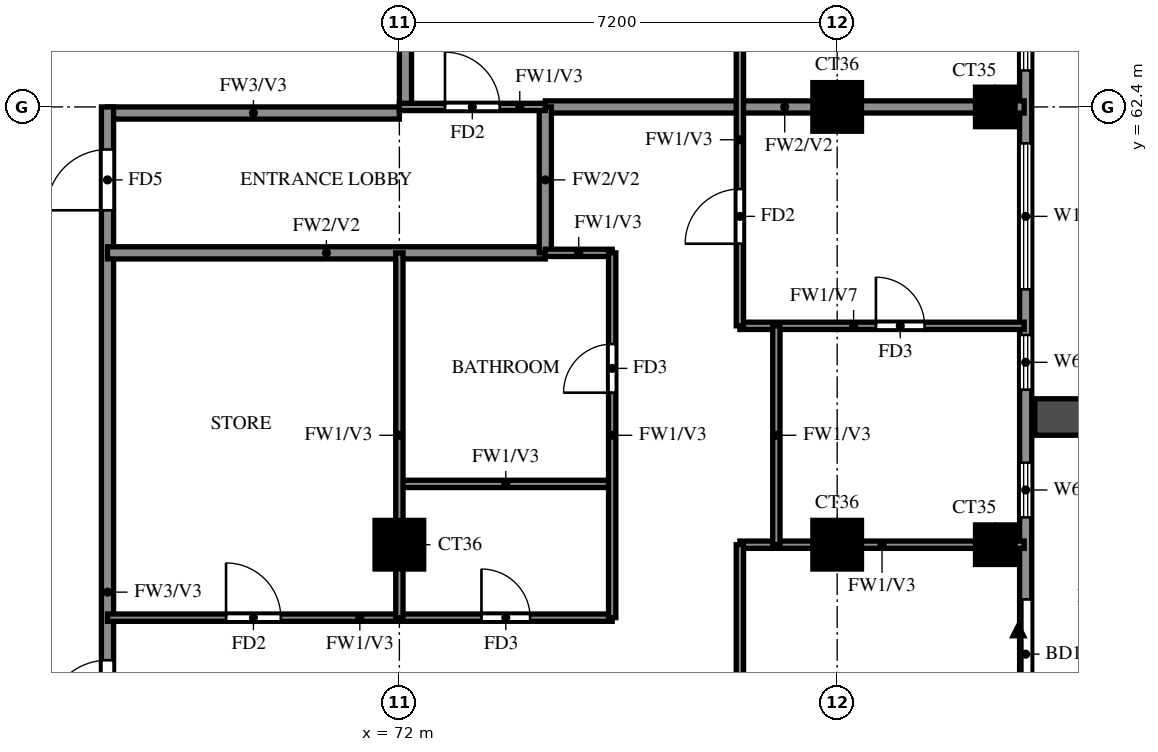
"""IFC4 building model, lengths in metres.
Left out: names, types, materials, properties, quantities, classifications, styles, units other than length and angle.
Written with IfcOpenShell. Run it as: python <this file> out.ifc"""

import sys

from ifc_helpers import new_model, si_unit, direction, frame, frame_2d, origin, origin_2d, place, context, subcontext, project, spatial, rectangle, extrude, source, transform, mapped, element, fill, save


model = new_model("IFC4")
c1 = context("Model", 3, precision=1e-05, world=origin(), true_north=direction((0.0, 1.0)))
c2 = subcontext(c1, "Body", "Model", "MODEL_VIEW")
j1 = project(units=[si_unit("LENGTHUNIT", "METRE"), si_unit("PLANEANGLEUNIT", "RADIAN")], contexts=[c1])
p1 = place(None, origin())
s1 = spatial("IfcSite", under=j1, at=p1, CompositionType="ELEMENT")
p2 = place(p1, origin())
s2 = spatial("IfcBuilding", under=s1, at=p2, CompositionType="ELEMENT")
p3 = place(p2, frame((0.0, 0.0, 232.5)))
s3 = spatial("IfcBuildingStorey", under=s2, at=p3, CompositionType="ELEMENT", Elevation=232.5)
m1 = source(origin(), c2, "Body", "SweptSolid", [
    extrude(rectangle(XDim=0.8, YDim=0.8, at=origin_2d()), origin(), (0.0, 0.0, 1.0), 3.22),
])
for number, where, z_axis, x_axis in (
    (1, (72.0, 55.2, 0.0), (0.0, 0.0, 1.0), (1.0, 0.0, 0.0)),
    (2, (79.2, 55.2, 0.0), (0.0, 0.0, 1.0), (1.0, 0.0, 0.0)),
):
    element("IfcColumn", number, at=place(p3, frame(where, z_axis=z_axis, x_axis=x_axis)), inside=s3, PredefinedType="COLUMN", context=c2, shape_type="MappedRepresentation", body=[
        mapped(m1, transform((0.0, 0.0, 0.0))),
    ])
m2 = source(origin(), c2, "Body", "SweptSolid", [
    extrude(rectangle(XDim=0.65, YDim=0.65, at=origin_2d()), origin(), (0.0, 0.0, 1.0), 3.22),
])
p4 = place(p3, frame((81.8, 55.2, 0.0), z_axis=(0.0, 0.0, 1.0), x_axis=(1.0, 0.0, 0.0)))
e3 = element("IfcColumn", 3, at=p4, inside=s3, PredefinedType="COLUMN", context=c2, shape_type="MappedRepresentation", body=[
    mapped(m2, transform((0.0, 0.0, 0.0))),
])
p5 = place(p3, frame((79.2, 62.4, 0.0), z_axis=(0.0, 0.0, 1.0), x_axis=(1.0, 0.0, 0.0)))
e4 = element("IfcColumn", 4, at=p5, inside=s3, PredefinedType="COLUMN", context=c2, shape_type="MappedRepresentation", body=[
    mapped(m1, transform((0.0, 0.0, 0.0))),
])
p6 = place(p3, frame((81.8, 62.4, 0.0), z_axis=(0.0, 0.0, 1.0), x_axis=(1.0, 0.0, 0.0)))
e5 = element("IfcColumn", 5, at=p6, inside=s3, PredefinedType="COLUMN", context=c2, shape_type="MappedRepresentation", body=[
    mapped(m2, transform((0.0, 0.0, 0.0))),
])
p7 = place(p3, frame((82.3, 48.2, 0.0), z_axis=(0.0, 0.0, 1.0), x_axis=(0.0, 1.0, 0.0)))
e6 = element("IfcWall", 6, at=p7, inside=s3, PredefinedType="SOLIDWALL", context=c2, shape_type="SweptSolid", body=[
    extrude(rectangle(XDim=28.6, YDim=0.2, at=frame_2d((14.3, 0.0))), origin(), (0.0, 0.0, 1.0), 3.22),
])
p8 = place(p7, frame((4.3, 0.0, 0.0)))
e7 = element("IfcOpeningElement", 7, at=p8, cuts=e6, PredefinedType="OPENING", context=c2, shape_type="SweptSolid", body=[
    extrude(rectangle(XDim=1.8, YDim=2.4, at=frame_2d((0.9, 1.2))), frame((0.0, 0.11, 0.0), z_axis=(0.0, -1.0, 0.0), x_axis=(1.0, 0.0, 0.0)), (0.0, 0.0, 1.0), 0.22),
])
p9 = place(p7, frame((0.6, 0.0, 0.6)))
e8 = element("IfcOpeningElement", 8, at=p9, cuts=e6, PredefinedType="OPENING", context=c2, shape_type="SweptSolid", body=[
    extrude(rectangle(XDim=1.2, YDim=2.4, at=frame_2d((0.6, 1.2))), frame((0.0, 0.11, 0.0), z_axis=(0.0, -1.0, 0.0), x_axis=(1.0, 0.0, 0.0)), (0.0, 0.0, 1.0), 0.22),
])
p10 = place(p7, frame((2.95, 0.0, 0.6)))
e9 = element("IfcOpeningElement", 9, at=p10, cuts=e6, PredefinedType="OPENING", context=c2, shape_type="SweptSolid", body=[
    extrude(rectangle(XDim=0.9, YDim=2.4, at=frame_2d((0.45, 1.2))), frame((0.0, 0.11, 0.0), z_axis=(0.0, -1.0, 0.0), x_axis=(1.0, 0.0, 0.0)), (0.0, 0.0, 1.0), 0.22),
])
p11 = place(p7, frame((11.2, 0.0, 0.6)))
e10 = element("IfcOpeningElement", 10, at=p11, cuts=e6, PredefinedType="OPENING", context=c2, shape_type="SweptSolid", body=[
    extrude(rectangle(XDim=2.4, YDim=2.4, at=frame_2d((1.2, 1.2))), frame((0.0, 0.11, 0.0), z_axis=(0.0, -1.0, 0.0), x_axis=(1.0, 0.0, 0.0)), (0.0, 0.0, 1.0), 0.22),
])
p12 = place(p7, frame((7.45, 0.0, 1.5)))
e11 = element("IfcOpeningElement", 11, at=p12, cuts=e6, PredefinedType="OPENING", context=c2, shape_type="SweptSolid", body=[
    extrude(rectangle(XDim=0.9, YDim=0.9, at=frame_2d((0.45, 0.45))), frame((0.0, 0.11, 0.0), z_axis=(0.0, -1.0, 0.0), x_axis=(1.0, 0.0, 0.0)), (0.0, 0.0, 1.0), 0.22),
])
p13 = place(p7, frame((9.55, 0.0, 1.5)))
e12 = element("IfcOpeningElement", 12, at=p13, cuts=e6, PredefinedType="OPENING", context=c2, shape_type="SweptSolid", body=[
    extrude(rectangle(XDim=0.9, YDim=0.9, at=frame_2d((0.45, 0.45))), frame((0.0, 0.11, 0.0), z_axis=(0.0, -1.0, 0.0), x_axis=(1.0, 0.0, 0.0)), (0.0, 0.0, 1.0), 0.22),
])
p14 = place(p7, frame((14.8, 0.0, 0.6)))
e13 = element("IfcOpeningElement", 13, at=p14, cuts=e6, PredefinedType="OPENING", context=c2, shape_type="SweptSolid", body=[
    extrude(rectangle(XDim=2.4, YDim=2.4, at=frame_2d((1.2, 1.2))), frame((0.0, 0.11, 0.0), z_axis=(0.0, -1.0, 0.0), x_axis=(1.0, 0.0, 0.0)), (0.0, 0.0, 1.0), 0.22),
])
p15 = place(p7, frame((19.15, 0.0, 1.5)))
e14 = element("IfcOpeningElement", 14, at=p15, cuts=e6, PredefinedType="OPENING", context=c2, shape_type="SweptSolid", body=[
    extrude(rectangle(XDim=0.9, YDim=0.9, at=frame_2d((0.45, 0.45))), frame((0.0, 0.11, 0.0), z_axis=(0.0, -1.0, 0.0), x_axis=(1.0, 0.0, 0.0)), (0.0, 0.0, 1.0), 0.22),
])
p16 = place(p7, frame((22.0, 0.0, 0.6)))
e15 = element("IfcOpeningElement", 15, at=p16, cuts=e6, PredefinedType="OPENING", context=c2, shape_type="SweptSolid", body=[
    extrude(rectangle(XDim=2.4, YDim=2.4, at=frame_2d((1.2, 1.2))), frame((0.0, 0.11, 0.0), z_axis=(0.0, -1.0, 0.0), x_axis=(1.0, 0.0, 0.0)), (0.0, 0.0, 1.0), 0.22),
])
p17 = place(p7, frame((25.5, 0.0, 0.6)))
e16 = element("IfcOpeningElement", 16, at=p17, cuts=e6, PredefinedType="OPENING", context=c2, shape_type="SweptSolid", body=[
    extrude(rectangle(XDim=2.4, YDim=2.4, at=frame_2d((1.2, 1.2))), frame((0.0, 0.11, 0.0), z_axis=(0.0, -1.0, 0.0), x_axis=(1.0, 0.0, 0.0)), (0.0, 0.0, 1.0), 0.22),
])
p18 = place(p3, frame((82.45, 57.3, 0.0), z_axis=(0.0, 0.0, 1.0), x_axis=(1.0, 0.0, 0.0)))
e17 = element("IfcWall", 17, at=p18, inside=s3, PredefinedType="SOLIDWALL", context=c2, shape_type="SweptSolid", body=[
    extrude(rectangle(XDim=2.65, YDim=0.6, at=frame_2d((1.325, 0.0))), origin(), (0.0, 0.0, 1.0), 2.85),
])
p19 = place(p3, frame((67.2, 62.3, 0.0), z_axis=(0.0, 0.0, 1.0), x_axis=(1.0, 0.0, 0.0)))
e18 = element("IfcWall", 18, at=p19, inside=s3, PredefinedType="SOLIDWALL", context=c2, shape_type="SweptSolid", body=[
    extrude(rectangle(XDim=4.8, YDim=0.2, at=frame_2d((2.4, 0.0))), origin(), (0.0, 0.0, 1.0), 3.22),
])
p20 = place(p3, frame((67.2, 45.6, 0.0), z_axis=(0.0, 0.0, 1.0), x_axis=(0.0, 1.0, 0.0)))
e19 = element("IfcWall", 19, at=p20, inside=s3, PredefinedType="SOLIDWALL", context=c2, shape_type="SweptSolid", body=[
    extrude(rectangle(XDim=16.8, YDim=0.2, at=frame_2d((8.4, 0.0))), origin(), (0.0, 0.0, 1.0), 3.22),
])
p21 = place(p20, frame((6.7, 0.0, 0.0)))
e20 = element("IfcOpeningElement", 20, at=p21, cuts=e19, PredefinedType="OPENING", context=c2, shape_type="SweptSolid", body=[
    extrude(rectangle(XDim=1.0, YDim=2.1, at=frame_2d((0.5, 1.05))), frame((0.0, 0.11, 0.0), z_axis=(0.0, -1.0, 0.0), x_axis=(1.0, 0.0, 0.0)), (0.0, 0.0, 1.0), 0.22),
])
p22 = place(p20, frame((15.1, 0.0, 0.0)))
e21 = element("IfcOpeningElement", 21, at=p22, cuts=e19, PredefinedType="OPENING", context=c2, shape_type="SweptSolid", body=[
    extrude(rectangle(XDim=1.0, YDim=2.1, at=frame_2d((0.5, 1.05))), frame((0.0, 0.11, 0.0), z_axis=(0.0, -1.0, 0.0), x_axis=(1.0, 0.0, 0.0)), (0.0, 0.0, 1.0), 0.22),
])
p23 = place(p20, frame((0.7, 0.0, 0.0)))
e22 = element("IfcOpeningElement", 22, at=p23, cuts=e19, PredefinedType="OPENING", context=c2, shape_type="SweptSolid", body=[
    extrude(rectangle(XDim=1.0, YDim=2.1, at=frame_2d((0.5, 1.05))), frame((0.0, 0.11, 0.0), z_axis=(0.0, -1.0, 0.0), x_axis=(1.0, 0.0, 0.0)), (0.0, 0.0, 1.0), 0.22),
])
p24 = place(p3, frame((72.1, 62.4, 0.0), z_axis=(0.0, 0.0, 1.0), x_axis=(0.0, 1.0, 0.0)))
e23 = element("IfcWall", 23, at=p24, inside=s3, PredefinedType="SOLIDWALL", context=c2, shape_type="SweptSolid", body=[
    extrude(rectangle(XDim=15.6, YDim=0.2, at=frame_2d((7.8, 0.0))), origin(), (0.0, 0.0, 1.0), 3.22),
])
p25 = place(p3, frame((67.2, 60.0, 0.0), z_axis=(0.0, 0.0, 1.0), x_axis=(1.0, 0.0, 0.0)))
e24 = element("IfcWall", 24, at=p25, inside=s3, PredefinedType="SOLIDWALL", context=c2, shape_type="SweptSolid", body=[
    extrude(rectangle(XDim=7.2, YDim=0.2, at=frame_2d((3.6, 0.0))), origin(), (0.0, 0.0, 1.0), 3.22),
])
p26 = place(p3, frame((74.4, 62.4, 0.0), z_axis=(0.0, 0.0, 1.0), x_axis=(1.0, 0.0, 0.0)))
e25 = element("IfcWall", 25, at=p26, inside=s3, PredefinedType="SOLIDWALL", context=c2, shape_type="SweptSolid", body=[
    extrude(rectangle(XDim=7.875, YDim=0.2, at=frame_2d((3.938, 0.0))), origin(), (0.0, 0.0, 1.0), 3.22),
])
p27 = place(p3, frame((74.4, 60.0, 0.0), z_axis=(0.0, 0.0, 1.0), x_axis=(0.0, 1.0, 0.0)))
e26 = element("IfcWall", 26, at=p27, inside=s3, PredefinedType="SOLIDWALL", context=c2, shape_type="SweptSolid", body=[
    extrude(rectangle(XDim=2.4, YDim=0.2, at=frame_2d((1.2, 0.0))), origin(), (0.0, 0.0, 1.0), 3.22),
])
p28 = place(p3, frame((67.2, 54.0, 0.0), z_axis=(0.0, 0.0, 1.0), x_axis=(1.0, 0.0, 0.0)))
e27 = element("IfcWall", 27, at=p28, inside=s3, PredefinedType="PARTITIONING", context=c2, shape_type="SweptSolid", body=[
    extrude(rectangle(XDim=8.3, YDim=0.12, at=frame_2d((4.15, 0.0))), origin(), (0.0, 0.0, 1.0), 3.22),
])
p29 = place(p28, frame((6.15, 0.0, 0.0)))
e28 = element("IfcOpeningElement", 28, at=p29, cuts=e27, PredefinedType="OPENING", context=c2, shape_type="SweptSolid", body=[
    extrude(rectangle(XDim=0.8, YDim=2.1, at=frame_2d((0.4, 1.05))), frame((0.0, 0.07, 0.0), z_axis=(0.0, -1.0, 0.0), x_axis=(1.0, 0.0, 0.0)), (0.0, 0.0, 1.0), 0.14),
])
p30 = place(p28, frame((1.95, 0.0, 0.0)))
e29 = element("IfcOpeningElement", 29, at=p30, cuts=e27, PredefinedType="OPENING", context=c2, shape_type="SweptSolid", body=[
    extrude(rectangle(XDim=0.9, YDim=2.1, at=frame_2d((0.45, 1.05))), frame((0.0, 0.07, 0.0), z_axis=(0.0, -1.0, 0.0), x_axis=(1.0, 0.0, 0.0)), (0.0, 0.0, 1.0), 0.14),
])
p31 = place(p3, frame((77.6, 55.2, 0.0), z_axis=(0.0, 0.0, 1.0), x_axis=(1.0, 0.0, 0.0)))
e30 = element("IfcWall", 30, at=p31, inside=s3, PredefinedType="PARTITIONING", context=c2, shape_type="SweptSolid", body=[
    extrude(rectangle(XDim=4.675, YDim=0.12, at=frame_2d((2.337, 0.0))), origin(), (0.0, 0.0, 1.0), 3.22),
])
p32 = place(p3, frame((72.0, 56.2, 0.0), z_axis=(0.0, 0.0, 1.0), x_axis=(1.0, 0.0, 0.0)))
e31 = element("IfcWall", 31, at=p32, inside=s3, PredefinedType="PARTITIONING", context=c2, shape_type="SweptSolid", body=[
    extrude(rectangle(XDim=3.5, YDim=0.12, at=frame_2d((1.75, 0.0))), origin(), (0.0, 0.0, 1.0), 3.22),
])
p33 = place(p3, frame((77.6, 58.8, 0.0), z_axis=(0.0, 0.0, 1.0), x_axis=(1.0, 0.0, 0.0)))
e32 = element("IfcWall", 32, at=p33, inside=s3, PredefinedType="PARTITIONING", context=c2, shape_type="SweptSolid", body=[
    extrude(rectangle(XDim=4.675, YDim=0.12, at=frame_2d((2.337, 0.0))), origin(), (0.0, 0.0, 1.0), 2.32),
])
p34 = place(p33, frame((2.238, 0.0, 0.0)))
e33 = element("IfcOpeningElement", 33, at=p34, cuts=e32, PredefinedType="OPENING", context=c2, shape_type="SweptSolid", body=[
    extrude(rectangle(XDim=0.8, YDim=2.1, at=frame_2d((0.4, 1.05))), frame((0.0, 0.07, 0.0), z_axis=(0.0, -1.0, 0.0), x_axis=(1.0, 0.0, 0.0)), (0.0, 0.0, 1.0), 0.14),
])
p35 = place(p3, frame((74.4, 60.0, 0.0), z_axis=(0.0, 0.0, 1.0), x_axis=(1.0, 0.0, 0.0)))
e34 = element("IfcWall", 34, at=p35, inside=s3, PredefinedType="PARTITIONING", context=c2, shape_type="SweptSolid", body=[
    extrude(rectangle(XDim=1.1, YDim=0.12, at=frame_2d((0.55, 0.0))), origin(), (0.0, 0.0, 1.0), 3.22),
])
p36 = place(p3, frame((72.0, 62.4, 0.0), z_axis=(0.0, 0.0, 1.0), x_axis=(1.0, 0.0, 0.0)))
e35 = element("IfcWall", 35, at=p36, inside=s3, PredefinedType="PARTITIONING", context=c2, shape_type="SweptSolid", body=[
    extrude(rectangle(XDim=2.4, YDim=0.12, at=frame_2d((1.2, 0.0))), origin(), (0.0, 0.0, 1.0), 3.22),
])
p37 = place(p36, frame((0.75, 0.0, 0.0)))
e36 = element("IfcOpeningElement", 36, at=p37, cuts=e35, PredefinedType="OPENING", context=c2, shape_type="SweptSolid", body=[
    extrude(rectangle(XDim=0.9, YDim=2.1, at=frame_2d((0.45, 1.05))), frame((0.0, 0.07, 0.0), z_axis=(0.0, -1.0, 0.0), x_axis=(1.0, 0.0, 0.0)), (0.0, 0.0, 1.0), 0.14),
])
p38 = place(p3, frame((72.0, 54.0, 0.0), z_axis=(0.0, 0.0, 1.0), x_axis=(0.0, 1.0, 0.0)))
e37 = element("IfcWall", 37, at=p38, inside=s3, PredefinedType="PARTITIONING", context=c2, shape_type="SweptSolid", body=[
    extrude(rectangle(XDim=6.0, YDim=0.12, at=frame_2d((3.0, 0.0))), origin(), (0.0, 0.0, 1.0), 3.22),
])
p39 = place(p3, frame((75.5, 54.0, 0.0), z_axis=(0.0, 0.0, 1.0), x_axis=(0.0, 1.0, 0.0)))
e38 = element("IfcWall", 38, at=p39, inside=s3, PredefinedType="PARTITIONING", context=c2, shape_type="SweptSolid", body=[
    extrude(rectangle(XDim=6.0, YDim=0.12, at=frame_2d((3.0, 0.0))), origin(), (0.0, 0.0, 1.0), 3.22),
])
p40 = place(p39, frame((3.7, 0.0, 0.0)))
e39 = element("IfcOpeningElement", 39, at=p40, cuts=e38, PredefinedType="OPENING", context=c2, shape_type="SweptSolid", body=[
    extrude(rectangle(XDim=0.8, YDim=2.1, at=frame_2d((0.4, 1.05))), frame((0.0, 0.07, 0.0), z_axis=(0.0, -1.0, 0.0), x_axis=(1.0, 0.0, 0.0)), (0.0, 0.0, 1.0), 0.14),
])
p41 = place(p3, frame((77.6, 48.125, 0.0), z_axis=(0.0, 0.0, 1.0), x_axis=(0.0, 1.0, 0.0)))
e40 = element("IfcWall", 40, at=p41, inside=s3, PredefinedType="PARTITIONING", context=c2, shape_type="SweptSolid", body=[
    extrude(rectangle(XDim=7.075, YDim=0.12, at=frame_2d((3.538, 0.0))), origin(), (0.0, 0.0, 1.0), 3.22),
])
p42 = place(p41, frame((2.788, 0.0, 0.0)))
e41 = element("IfcOpeningElement", 41, at=p42, cuts=e40, PredefinedType="OPENING", context=c2, shape_type="SweptSolid", body=[
    extrude(rectangle(XDim=1.5, YDim=2.1, at=frame_2d((0.75, 1.05))), frame((0.0, 0.07, 0.0), z_axis=(0.0, -1.0, 0.0), x_axis=(1.0, 0.0, 0.0)), (0.0, 0.0, 1.0), 0.14),
])
p43 = place(p3, frame((77.6, 58.8, 0.0), z_axis=(0.0, 0.0, 1.0), x_axis=(0.0, 1.0, 0.0)))
e42 = element("IfcWall", 42, at=p43, inside=s3, PredefinedType="PARTITIONING", context=c2, shape_type="SweptSolid", body=[
    extrude(rectangle(XDim=7.2, YDim=0.12, at=frame_2d((3.6, 0.0))), origin(), (0.0, 0.0, 1.0), 3.22),
])
p44 = place(p43, frame((1.35, 0.0, 0.0)))
e43 = element("IfcOpeningElement", 43, at=p44, cuts=e42, PredefinedType="OPENING", context=c2, shape_type="SweptSolid", body=[
    extrude(rectangle(XDim=0.9, YDim=2.1, at=frame_2d((0.45, 1.05))), frame((0.0, 0.07, 0.0), z_axis=(0.0, -1.0, 0.0), x_axis=(1.0, 0.0, 0.0)), (0.0, 0.0, 1.0), 0.14),
])
p45 = place(p43, frame((4.95, 0.0, 0.0)))
e44 = element("IfcOpeningElement", 44, at=p45, cuts=e42, PredefinedType="OPENING", context=c2, shape_type="SweptSolid", body=[
    extrude(rectangle(XDim=0.9, YDim=2.1, at=frame_2d((0.45, 1.05))), frame((0.0, 0.07, 0.0), z_axis=(0.0, -1.0, 0.0), x_axis=(1.0, 0.0, 0.0)), (0.0, 0.0, 1.0), 0.14),
])
p46 = place(p3, frame((78.2, 55.2, 0.0), z_axis=(0.0, 0.0, 1.0), x_axis=(0.0, 1.0, 0.0)))
e45 = element("IfcWall", 45, at=p46, inside=s3, PredefinedType="PARTITIONING", context=c2, shape_type="SweptSolid", body=[
    extrude(rectangle(XDim=3.6, YDim=0.12, at=frame_2d((1.8, 0.0))), origin(), (0.0, 0.0, 1.0), 3.22),
])
p47 = place(p8, origin())
e46 = element("IfcDoor", 46, at=p47, inside=s3, OperationType="DOUBLE_DOOR_SLIDING", PredefinedType="DOOR", context=c2, shape_type="SweptSolid", body=[
    extrude(rectangle(XDim=1.8, YDim=2.4, at=frame_2d((0.9, 1.2))), frame((0.0, 0.025, 0.0), z_axis=(0.0, -1.0, 0.0), x_axis=(1.0, 0.0, 0.0)), (0.0, 0.0, 1.0), 0.05),
])
fill(e7, e46)
p48 = place(p11, origin())
e47 = element("IfcWindow", 47, at=p48, inside=s3, PartitioningType="DOUBLE_PANEL_VERTICAL", PredefinedType="WINDOW", context=c2, shape_type="SweptSolid", body=[
    extrude(rectangle(XDim=2.4, YDim=2.4, at=frame_2d((1.2, 1.2))), frame((0.0, 0.03, 0.0), z_axis=(0.0, -1.0, 0.0), x_axis=(1.0, 0.0, 0.0)), (0.0, 0.0, 1.0), 0.06),
])
fill(e10, e47)
p49 = place(p12, origin())
e48 = element("IfcWindow", 48, at=p49, inside=s3, PartitioningType="SINGLE_PANEL", PredefinedType="WINDOW", context=c2, shape_type="SweptSolid", body=[
    extrude(rectangle(XDim=0.9, YDim=0.9, at=frame_2d((0.45, 0.45))), frame((0.0, 0.03, 0.0), z_axis=(0.0, -1.0, 0.0), x_axis=(1.0, 0.0, 0.0)), (0.0, 0.0, 1.0), 0.06),
])
fill(e11, e48)
p50 = place(p13, origin())
e49 = element("IfcWindow", 49, at=p50, inside=s3, PartitioningType="SINGLE_PANEL", PredefinedType="WINDOW", context=c2, shape_type="SweptSolid", body=[
    extrude(rectangle(XDim=0.9, YDim=0.9, at=frame_2d((0.45, 0.45))), frame((0.0, 0.03, 0.0), z_axis=(0.0, -1.0, 0.0), x_axis=(1.0, 0.0, 0.0)), (0.0, 0.0, 1.0), 0.06),
])
fill(e12, e49)
p51 = place(p14, origin())
e50 = element("IfcWindow", 50, at=p51, inside=s3, PartitioningType="DOUBLE_PANEL_VERTICAL", PredefinedType="WINDOW", context=c2, shape_type="SweptSolid", body=[
    extrude(rectangle(XDim=2.4, YDim=2.4, at=frame_2d((1.2, 1.2))), frame((0.0, 0.03, 0.0), z_axis=(0.0, -1.0, 0.0), x_axis=(1.0, 0.0, 0.0)), (0.0, 0.0, 1.0), 0.06),
])
fill(e13, e50)
p52 = place(p21, origin())
e51 = element("IfcDoor", 51, at=p52, inside=s3, OperationType="SINGLE_SWING_RIGHT", PredefinedType="DOOR", context=c2, shape_type="SweptSolid", body=[
    extrude(rectangle(XDim=1.0, YDim=2.1, at=frame_2d((0.5, 1.05))), frame((0.0, 0.025, 0.0), z_axis=(0.0, -1.0, 0.0), x_axis=(1.0, 0.0, 0.0)), (0.0, 0.0, 1.0), 0.05),
])
fill(e20, e51)
p53 = place(p44, origin())
e52 = element("IfcDoor", 52, at=p53, inside=s3, OperationType="SINGLE_SWING_LEFT", PredefinedType="DOOR", context=c2, shape_type="SweptSolid", body=[
    extrude(rectangle(XDim=0.9, YDim=2.1, at=frame_2d((0.45, 1.05))), frame((0.0, 0.025, 0.0), z_axis=(0.0, -1.0, 0.0), x_axis=(1.0, 0.0, 0.0)), (0.0, 0.0, 1.0), 0.05),
])
fill(e43, e52)
p54 = place(p34, origin())
e53 = element("IfcDoor", 53, at=p54, inside=s3, OperationType="SINGLE_SWING_RIGHT", PredefinedType="DOOR", context=c2, shape_type="SweptSolid", body=[
    extrude(rectangle(XDim=0.8, YDim=2.1, at=frame_2d((0.4, 1.05))), frame((0.0, 0.025, 0.0), z_axis=(0.0, -1.0, 0.0), x_axis=(1.0, 0.0, 0.0)), (0.0, 0.0, 1.0), 0.05),
])
fill(e33, e53)
p55 = place(p29, origin())
e54 = element("IfcDoor", 54, at=p55, inside=s3, OperationType="SINGLE_SWING_LEFT", PredefinedType="DOOR", context=c2, shape_type="SweptSolid", body=[
    extrude(rectangle(XDim=0.8, YDim=2.1, at=frame_2d((0.4, 1.05))), frame((0.0, 0.025, 0.0), z_axis=(0.0, -1.0, 0.0), x_axis=(1.0, 0.0, 0.0)), (0.0, 0.0, 1.0), 0.05),
])
fill(e28, e54)
p56 = place(p40, origin())
e55 = element("IfcDoor", 55, at=p56, inside=s3, OperationType="SINGLE_SWING_RIGHT", PredefinedType="DOOR", context=c2, shape_type="SweptSolid", body=[
    extrude(rectangle(XDim=0.8, YDim=2.1, at=frame_2d((0.4, 1.05))), frame((0.0, 0.025, 0.0), z_axis=(0.0, -1.0, 0.0), x_axis=(1.0, 0.0, 0.0)), (0.0, 0.0, 1.0), 0.05),
])
fill(e39, e55)
p57 = place(p30, origin())
e56 = element("IfcDoor", 56, at=p57, inside=s3, OperationType="SINGLE_SWING_LEFT", PredefinedType="DOOR", context=c2, shape_type="SweptSolid", body=[
    extrude(rectangle(XDim=0.9, YDim=2.1, at=frame_2d((0.45, 1.05))), frame((0.0, 0.025, 0.0), z_axis=(0.0, -1.0, 0.0), x_axis=(1.0, 0.0, 0.0)), (0.0, 0.0, 1.0), 0.05),
])
fill(e29, e56)
p58 = place(p37, origin())
e57 = element("IfcDoor", 57, at=p58, inside=s3, OperationType="SINGLE_SWING_LEFT", PredefinedType="DOOR", context=c2, shape_type="SweptSolid", body=[
    extrude(rectangle(XDim=0.9, YDim=2.1, at=frame_2d((0.45, 1.05))), frame((0.0, 0.025, 0.0), z_axis=(0.0, -1.0, 0.0), x_axis=(1.0, 0.0, 0.0)), (0.0, 0.0, 1.0), 0.05),
])
fill(e36, e57)
p59 = place(p22, origin())
e58 = element("IfcDoor", 58, at=p59, inside=s3, OperationType="SINGLE_SWING_LEFT", PredefinedType="DOOR", context=c2, shape_type="SweptSolid", body=[
    extrude(rectangle(XDim=1.0, YDim=2.1, at=frame_2d((0.5, 1.05))), frame((0.0, 0.025, 0.0), z_axis=(0.0, -1.0, 0.0), x_axis=(1.0, 0.0, 0.0)), (0.0, 0.0, 1.0), 0.05),
])
fill(e21, e58)
save(model, sys.argv[1])
